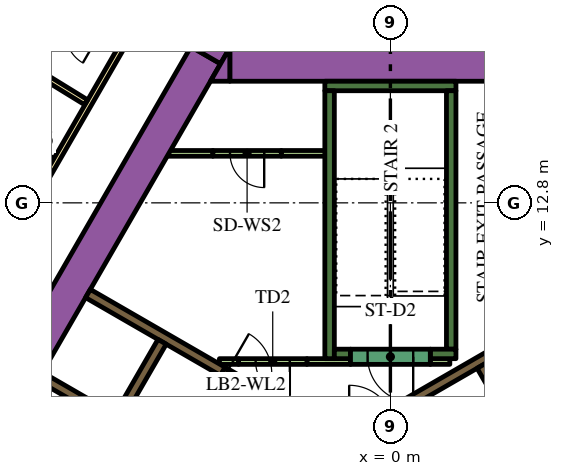
"""IFC4 building model, lengths in metres.
Left out: names, types, materials, properties, quantities, classifications, styles, units other than length and angle.
Written with IfcOpenShell. Run it as: python <this file> out.ifc"""

import sys

from ifc_helpers import new_model, si_unit, direction, frame, frame_2d, origin, place, context, subcontext, project, spatial, polyline, rectangle, outline, extrude, element, fill, save


model = new_model("IFC4")
c1 = context("Model", 3, precision=1e-05, world=origin(), true_north=direction((0.0, 1.0)))
c2 = subcontext(c1, "Body", "Model", "MODEL_VIEW")
j1 = project(units=[si_unit("LENGTHUNIT", "METRE"), si_unit("PLANEANGLEUNIT", "RADIAN")], contexts=[c1])
p1 = place(None, origin())
s1 = spatial("IfcSite", under=j1, at=p1, CompositionType="ELEMENT")
p2 = place(p1, origin())
s2 = spatial("IfcBuilding", under=s1, at=p2, CompositionType="ELEMENT")
p3 = place(p2, frame((0.0, 0.0, 35.4)))
s3 = spatial("IfcBuildingStorey", under=s2, at=p3, CompositionType="ELEMENT", Elevation=35.4)
p4 = place(p3, frame((-15.36, -1.503, 0.0), z_axis=(0.0, 0.0, 1.0), x_axis=(0.50000389221, 0.866023156604, 0.0)))
e1 = element("IfcWall", 1, at=p4, inside=s3, PredefinedType="SOLIDWALL", context=c2, shape_type="SweptSolid", body=[
    extrude(rectangle(XDim=21.0, YDim=0.9, at=frame_2d((10.5, 0.0))), origin(), (0.0, 0.0, 1.0), 3.9),
])
p5 = place(p3, origin())
e2 = element("IfcWall", 2, at=p5, inside=s3, PredefinedType="SOLIDWALL", context=c2, shape_type="SweptSolid", body=[
    extrude(outline(polyline([(-4.215, 16.9), (-4.469, 16.46), (-5.231, 16.9), (-4.215, 16.9)])), origin(), (0.0, 0.0, 1.0), 3.9),
])
p6 = place(p3, frame((-4.224, 16.45, 0.0), z_axis=(0.0, 0.0, 1.0), x_axis=(1.0, 0.0, 0.0)))
e3 = element("IfcWall", 3, at=p6, inside=s3, PredefinedType="SOLIDWALL", context=c2, shape_type="SweptSolid", body=[
    extrude(rectangle(XDim=9.488, YDim=0.9, at=frame_2d((4.744, 0.0))), origin(), (0.0, 0.0, 1.0), 3.9),
])
e4 = element("IfcWall", 4, at=p5, inside=s3, PredefinedType="SOLIDWALL", context=c2, shape_type="SweptSolid", body=[
    extrude(outline(polyline([(-4.734, 16.0), (-4.226, 16.88), (-4.226, 16.0), (-4.734, 16.0)])), origin(), (0.0, 0.0, 1.0), 3.9),
])
p7 = place(p3, frame((-1.725, 15.875, 0.0), z_axis=(0.0, 0.0, 1.0), x_axis=(1.0, 0.0, 0.0)))
e5 = element("IfcWall", 5, at=p7, inside=s3, PredefinedType="SOLIDWALL", context=c2, shape_type="SweptSolid", body=[
    extrude(rectangle(XDim=3.45, YDim=0.25, at=frame_2d((1.725, 0.0))), origin(), (0.0, 0.0, 1.0), 3.9),
])
p8 = place(p3, frame((1.6, 8.95, 0.0), z_axis=(0.0, 0.0, 1.0), x_axis=(0.0, 1.0, 0.0)))
e6 = element("IfcWall", 6, at=p8, inside=s3, PredefinedType="SOLIDWALL", context=c2, shape_type="SweptSolid", body=[
    extrude(rectangle(XDim=6.8, YDim=0.25, at=frame_2d((3.4, 0.0))), origin(), (0.0, 0.0, 1.0), 3.9),
])
p9 = place(p3, frame((1.05, 8.825, 0.0), z_axis=(0.0, 0.0, 1.0), x_axis=(1.0, 0.0, 0.0)))
e7 = element("IfcWall", 7, at=p9, inside=s3, PredefinedType="SOLIDWALL", context=c2, shape_type="SweptSolid", body=[
    extrude(rectangle(XDim=0.675, YDim=0.25, at=frame_2d((0.337, 0.0))), origin(), (0.0, 0.0, 1.0), 3.9),
])
p10 = place(p3, frame((-1.6, 8.7, 0.0), z_axis=(0.0, 0.0, 1.0), x_axis=(0.0, 1.0, 0.0)))
e8 = element("IfcWall", 8, at=p10, inside=s3, PredefinedType="SOLIDWALL", context=c2, shape_type="SweptSolid", body=[
    extrude(rectangle(XDim=7.05, YDim=0.25, at=frame_2d((3.525, 0.0))), origin(), (0.0, 0.0, 1.0), 3.9),
])
p11 = place(p3, frame((-1.475, 8.825, 0.0), z_axis=(0.0, 0.0, 1.0), x_axis=(1.0, 0.0, 0.0)))
e9 = element("IfcWall", 9, at=p11, inside=s3, PredefinedType="SOLIDWALL", context=c2, shape_type="SweptSolid", body=[
    extrude(rectangle(XDim=0.425, YDim=0.25, at=frame_2d((0.212, 0.0))), origin(), (0.0, 0.0, 1.0), 3.9),
])
p12 = place(p3, frame((0.314, 7.456, 0.0), z_axis=(0.0, 0.0, 1.0), x_axis=(0.866013897511, 0.50001992892, 0.0)))
e10 = element("IfcWall", 10, at=p12, inside=s3, PredefinedType="SOLIDWALL", context=c2, shape_type="SweptSolid", body=[
    extrude(rectangle(XDim=3.268, YDim=0.25, at=frame_2d((1.634, 0.0))), origin(), (0.0, 0.0, 1.0), 3.9),
])
e11 = element("IfcWall", 11, at=p5, inside=s3, PredefinedType="SOLIDWALL", context=c2, shape_type="SweptSolid", body=[
    extrude(outline(polyline([(-3.128, 7.481), (-3.259, 7.557), (-3.134, 7.773), (-3.003, 7.698), (-3.128, 7.481)])), origin(), (0.0, 0.0, 1.0), 3.9),
])
p13 = place(p3, frame((-7.314, 7.132, 0.0), z_axis=(0.0, 0.0, 1.0), x_axis=(-0.866008176907, 0.50002983664, 0.0)))
e12 = element("IfcWall", 12, at=p13, inside=s3, PredefinedType="SOLIDWALL", context=c2, shape_type="SweptSolid", body=[
    extrude(rectangle(XDim=2.2, YDim=0.25, at=frame_2d((1.1, 0.0))), origin(), (0.0, 0.0, 1.0), 3.9),
])
p14 = place(p3, frame((-7.959, 10.415, 0.0), z_axis=(0.0, 0.0, 1.0), x_axis=(0.866020958405, -0.500007699544, 0.0)))
e13 = element("IfcWall", 13, at=p14, inside=s3, PredefinedType="SOLIDWALL", context=c2, shape_type="SweptSolid", body=[
    extrude(rectangle(XDim=4.1, YDim=0.25, at=frame_2d((2.05, 0.0))), origin(), (0.0, 0.0, 1.0), 3.9),
])
p15 = place(p3, frame((-3.997, 8.625, 0.0), z_axis=(0.0, 0.0, 1.0), x_axis=(-1.0, 0.0, 0.0)))
e14 = element("IfcWall", 14, at=p15, inside=s3, PredefinedType="PARTITIONING", context=c2, shape_type="SweptSolid", body=[
    extrude(rectangle(XDim=0.502, YDim=0.15, at=frame_2d((0.251, 0.0))), origin(), (0.0, 0.0, 1.0), 2.75),
])
p16 = place(p3, frame((-2.196, 8.625, 0.0), z_axis=(0.0, 0.0, 1.0), x_axis=(1.0, 0.0, 0.0)))
e15 = element("IfcWall", 15, at=p16, inside=s3, PredefinedType="PARTITIONING", context=c2, shape_type="SweptSolid", body=[
    extrude(rectangle(XDim=1.146, YDim=0.15, at=frame_2d((0.573, 0.0))), origin(), (0.0, 0.0, 1.0), 2.75),
])
p17 = place(p3, frame((-5.851, 14.102, 0.0), z_axis=(0.0, 0.0, 1.0), x_axis=(1.0, 0.0, 0.0)))
e16 = element("IfcWall", 16, at=p17, inside=s3, PredefinedType="PARTITIONING", context=c2, shape_type="SweptSolid", body=[
    extrude(rectangle(XDim=1.18, YDim=0.15, at=frame_2d((0.59, 0.0))), origin(), (0.0, 0.0, 1.0), 2.75),
])
p18 = place(p3, frame((-2.871, 14.102, 0.0), z_axis=(0.0, 0.0, 1.0), x_axis=(1.0, 0.0, 0.0)))
e17 = element("IfcWall", 17, at=p18, inside=s3, PredefinedType="PARTITIONING", context=c2, shape_type="SweptSolid", body=[
    extrude(rectangle(XDim=1.196, YDim=0.15, at=frame_2d((0.598, 0.0))), origin(), (0.0, 0.0, 1.0), 2.75),
])
p19 = place(p3, frame((1.05, 8.625, 0.0), z_axis=(0.0, 0.0, 1.0), x_axis=(1.0, 0.0, 0.0)))
e18 = element("IfcWall", 18, at=p19, inside=s3, PredefinedType="PARTITIONING", context=c2, shape_type="SweptSolid", body=[
    extrude(rectangle(XDim=0.514, YDim=0.15, at=frame_2d((0.257, 0.0))), origin(), (0.0, 0.0, 1.0), 2.75),
])
p20 = place(p3, frame((8.565, -2.185, 0.0), z_axis=(0.0, 0.0, 1.0), x_axis=(-0.499997954832, 0.866026584559, 0.0)))
e19 = element("IfcWall", 19, at=p20, inside=s3, PredefinedType="SOLIDWALL", context=c2, shape_type="SweptSolid", body=[
    extrude(rectangle(XDim=12.35, YDim=0.25, at=frame_2d((6.175, 0.0))), origin(), (0.0, 0.0, 1.0), 3.9),
])
p21 = place(p20, frame((5.725, 0.0, 0.0)))
e20 = element("IfcOpeningElement", 20, at=p21, cuts=e19, PredefinedType="OPENING", context=c2, shape_type="SweptSolid", body=[
    extrude(rectangle(XDim=0.9, YDim=2.1, at=frame_2d((0.45, 1.05))), frame((0.0, 0.135, 0.0), z_axis=(0.0, -1.0, 0.0), x_axis=(1.0, 0.0, 0.0)), (0.0, 0.0, 1.0), 0.27),
])
p22 = place(p3, frame((-6.008, 9.144, 0.0), z_axis=(0.0, 0.0, 1.0), x_axis=(-0.500006956611, -0.866021387346, 0.0)))
e21 = element("IfcWall", 21, at=p22, inside=s3, PredefinedType="SOLIDWALL", context=c2, shape_type="SweptSolid", body=[
    extrude(rectangle(XDim=9.83, YDim=0.25, at=frame_2d((4.915, 0.0))), origin(), (0.0, 0.0, 1.0), 3.9),
])
p23 = place(p22, frame((6.985, 0.0, 0.0)))
e22 = element("IfcOpeningElement", 22, at=p23, cuts=e21, PredefinedType="OPENING", context=c2, shape_type="SweptSolid", body=[
    extrude(rectangle(XDim=0.9, YDim=2.1, at=frame_2d((0.45, 1.05))), frame((0.0, 0.135, 0.0), z_axis=(0.0, -1.0, 0.0), x_axis=(1.0, 0.0, 0.0)), (0.0, 0.0, 1.0), 0.27),
])
p24 = place(p3, frame((1.05, 8.75, 0.0), z_axis=(0.0, 0.0, 1.0), x_axis=(-1.0, 0.0, 0.0)))
e23 = element("IfcWall", 23, at=p24, inside=s3, PredefinedType="SOLIDWALL", context=c2, shape_type="SweptSolid", body=[
    extrude(rectangle(XDim=2.1, YDim=0.4, at=frame_2d((1.05, 0.0))), origin(), (0.0, 0.0, 1.0), 3.9),
])
p25 = place(p24, frame((0.45, 0.0, 0.0)))
e24 = element("IfcOpeningElement", 24, at=p25, cuts=e23, PredefinedType="OPENING", context=c2, shape_type="SweptSolid", body=[
    extrude(rectangle(XDim=1.2, YDim=2.1, at=frame_2d((0.6, 1.05))), frame((0.0, 0.21, 0.0), z_axis=(0.0, -1.0, 0.0), x_axis=(1.0, 0.0, 0.0)), (0.0, 0.0, 1.0), 0.42),
])
p26 = place(p3, frame((-2.196, 8.625, 0.0), z_axis=(0.0, 0.0, 1.0), x_axis=(-1.0, 0.0, 0.0)))
e25 = element("IfcWall", 25, at=p26, inside=s3, PredefinedType="PARTITIONING", context=c2, shape_type="SweptSolid", body=[
    extrude(rectangle(XDim=1.8, YDim=0.15, at=frame_2d((0.9, 0.0))), origin(), (0.0, 0.0, 1.0), 2.75),
])
p27 = place(p26, frame((0.45, 0.0, 0.0)))
e26 = element("IfcOpeningElement", 26, at=p27, cuts=e25, PredefinedType="OPENING", context=c2, shape_type="SweptSolid", body=[
    extrude(rectangle(XDim=0.9, YDim=2.1, at=frame_2d((0.45, 1.05))), frame((0.0, 0.085, 0.0), z_axis=(0.0, -1.0, 0.0), x_axis=(1.0, 0.0, 0.0)), (0.0, 0.0, 1.0), 0.17),
])
p28 = place(p3, frame((-4.409, 8.365, 0.0), z_axis=(0.0, 0.0, 1.0), x_axis=(0.866034573852, -0.49998411664, 0.0)))
e27 = element("IfcWall", 27, at=p28, inside=s3, PredefinedType="SOLIDWALL", context=c2, shape_type="SweptSolid", body=[
    extrude(rectangle(XDim=1.4, YDim=0.25, at=frame_2d((0.7, 0.0))), origin(), (0.0, 0.0, 1.0), 3.9),
])
p29 = place(p28, frame((0.1, 0.0, 0.0)))
e28 = element("IfcOpeningElement", 28, at=p29, cuts=e27, PredefinedType="OPENING", context=c2, shape_type="SweptSolid", body=[
    extrude(rectangle(XDim=1.2, YDim=2.1, at=frame_2d((0.6, 1.05))), frame((0.0, 0.135, 0.0), z_axis=(0.0, -1.0, 0.0), x_axis=(1.0, 0.0, 0.0)), (0.0, 0.0, 1.0), 0.27),
])
p30 = place(p3, frame((-2.871, 14.102, 0.0), z_axis=(0.0, 0.0, 1.0), x_axis=(-1.0, 0.0, 0.0)))
e29 = element("IfcWall", 29, at=p30, inside=s3, PredefinedType="PARTITIONING", context=c2, shape_type="SweptSolid", body=[
    extrude(rectangle(XDim=1.8, YDim=0.15, at=frame_2d((0.9, 0.0))), origin(), (0.0, 0.0, 1.0), 2.75),
])
p31 = place(p30, frame((0.45, 0.0, 0.0)))
e30 = element("IfcOpeningElement", 30, at=p31, cuts=e29, PredefinedType="OPENING", context=c2, shape_type="SweptSolid", body=[
    extrude(rectangle(XDim=0.9, YDim=2.1, at=frame_2d((0.45, 1.05))), frame((0.0, 0.085, 0.0), z_axis=(0.0, -1.0, 0.0), x_axis=(1.0, 0.0, 0.0)), (0.0, 0.0, 1.0), 0.17),
])
p32 = place(p3, frame((-19.081, -3.9, 0.0), z_axis=(0.0, 0.0, 1.0), x_axis=(0.499998313975, 0.866026377209, 0.0)))
e31 = element("IfcWall", 31, at=p32, inside=s3, PredefinedType="PARTITIONING", context=c2, shape_type="SweptSolid", body=[
    extrude(rectangle(XDim=25.766, YDim=0.15, at=frame_2d((12.883, 0.0))), origin(), (0.0, 0.0, 1.0), 2.75),
])
p33 = place(p32, frame((24.586, 0.0, 0.0)))
e32 = element("IfcOpeningElement", 32, at=p33, cuts=e31, PredefinedType="OPENING", context=c2, shape_type="SweptSolid", body=[
    extrude(rectangle(XDim=1.0, YDim=2.1, at=frame_2d((0.5, 1.05))), frame((0.0, 0.085, 0.0), z_axis=(0.0, -1.0, 0.0), x_axis=(1.0, 0.0, 0.0)), (0.0, 0.0, 1.0), 0.17),
])
p34 = place(p32, frame((16.196, 0.0, 0.0)))
e33 = element("IfcOpeningElement", 33, at=p34, cuts=e31, PredefinedType="OPENING", context=c2, shape_type="SweptSolid", body=[
    extrude(rectangle(XDim=1.0, YDim=2.1, at=frame_2d((0.5, 1.05))), frame((0.0, 0.085, 0.0), z_axis=(0.0, -1.0, 0.0), x_axis=(1.0, 0.0, 0.0)), (0.0, 0.0, 1.0), 0.17),
])
p35 = place(p32, frame((14.789, 0.0, 0.0)))
e34 = element("IfcOpeningElement", 34, at=p35, cuts=e31, PredefinedType="OPENING", context=c2, shape_type="SweptSolid", body=[
    extrude(rectangle(XDim=1.1, YDim=2.1, at=frame_2d((0.55, 1.05))), frame((0.0, 0.085, 0.0), z_axis=(0.0, -1.0, 0.0), x_axis=(1.0, 0.0, 0.0)), (0.0, 0.0, 1.0), 0.17),
])
p36 = place(p32, frame((3.698, 0.0, 0.0)))
e35 = element("IfcOpeningElement", 35, at=p36, cuts=e31, PredefinedType="OPENING", context=c2, shape_type="SweptSolid", body=[
    extrude(rectangle(XDim=1.0, YDim=2.1, at=frame_2d((0.5, 1.05))), frame((0.0, 0.085, 0.0), z_axis=(0.0, -1.0, 0.0), x_axis=(1.0, 0.0, 0.0)), (0.0, 0.0, 1.0), 0.17),
])
p37 = place(p32, frame((1.531, 0.0, 0.0)))
e36 = element("IfcOpeningElement", 36, at=p37, cuts=e31, PredefinedType="OPENING", context=c2, shape_type="SweptSolid", body=[
    extrude(rectangle(XDim=0.9, YDim=2.1, at=frame_2d((0.45, 1.05))), frame((0.0, 0.085, 0.0), z_axis=(0.0, -1.0, 0.0), x_axis=(1.0, 0.0, 0.0)), (0.0, 0.0, 1.0), 0.17),
])
p38 = place(p3, frame((-14.558, 19.475, 0.0), z_axis=(0.0, 0.0, 1.0), x_axis=(0.851829455142, -0.523819223925, 0.0)))
e37 = element("IfcWall", 37, at=p38, inside=s3, PredefinedType="PARTITIONING", context=c2, shape_type="SweptSolid", body=[
    extrude(rectangle(XDim=7.688, YDim=0.15, at=frame_2d((3.844, 0.0))), origin(), (0.0, 0.0, 1.0), 2.75),
])
p39 = place(p3, frame((-11.129, 15.224, 0.0), z_axis=(0.0, 0.0, 1.0), x_axis=(0.866021400173, -0.500006934395, 0.0)))
e38 = element("IfcWall", 38, at=p39, inside=s3, PredefinedType="PARTITIONING", context=c2, shape_type="SweptSolid", body=[
    extrude(rectangle(XDim=2.6, YDim=0.1, at=frame_2d((1.3, 0.0))), origin(), (0.0, 0.0, 1.0), 2.75),
])
p40 = place(p39, frame((1.1, 0.0, 0.0)))
e39 = element("IfcOpeningElement", 39, at=p40, cuts=e38, PredefinedType="OPENING", context=c2, shape_type="SweptSolid", body=[
    extrude(rectangle(XDim=0.9, YDim=2.1, at=frame_2d((0.45, 1.05))), frame((0.0, 0.06, 0.0), z_axis=(0.0, -1.0, 0.0), x_axis=(1.0, 0.0, 0.0)), (0.0, 0.0, 1.0), 0.12),
])
p41 = place(p25, origin())
e40 = element("IfcDoor", 40, at=p41, inside=s3, OperationType="SINGLE_SWING_LEFT", PredefinedType="DOOR", context=c2, shape_type="SweptSolid", body=[
    extrude(rectangle(XDim=1.2, YDim=2.1, at=frame_2d((0.6, 1.05))), frame((0.0, 0.025, 0.0), z_axis=(0.0, -1.0, 0.0), x_axis=(1.0, 0.0, 0.0)), (0.0, 0.0, 1.0), 0.05),
])
fill(e24, e40)
p42 = place(p27, origin())
e41 = element("IfcDoor", 41, at=p42, inside=s3, OperationType="SINGLE_SWING_LEFT", PredefinedType="DOOR", context=c2, shape_type="SweptSolid", body=[
    extrude(rectangle(XDim=0.9, YDim=2.1, at=frame_2d((0.45, 1.05))), frame((0.0, 0.025, 0.0), z_axis=(0.0, -1.0, 0.0), x_axis=(1.0, 0.0, 0.0)), (0.0, 0.0, 1.0), 0.05),
])
fill(e26, e41)
p43 = place(p29, origin())
e42 = element("IfcDoor", 42, at=p43, inside=s3, OperationType="SINGLE_SWING_LEFT", PredefinedType="DOOR", context=c2, shape_type="SweptSolid", body=[
    extrude(rectangle(XDim=1.2, YDim=2.1, at=frame_2d((0.6, 1.05))), frame((0.0, 0.025, 0.0), z_axis=(0.0, -1.0, 0.0), x_axis=(1.0, 0.0, 0.0)), (0.0, 0.0, 1.0), 0.05),
])
fill(e28, e42)
p44 = place(p31, origin())
e43 = element("IfcDoor", 43, at=p44, inside=s3, OperationType="SINGLE_SWING_LEFT", PredefinedType="DOOR", context=c2, shape_type="SweptSolid", body=[
    extrude(rectangle(XDim=0.9, YDim=2.1, at=frame_2d((0.45, 1.05))), frame((0.0, 0.025, 0.0), z_axis=(0.0, -1.0, 0.0), x_axis=(1.0, 0.0, 0.0)), (0.0, 0.0, 1.0), 0.05),
])
fill(e30, e43)
save(model, sys.argv[1])
